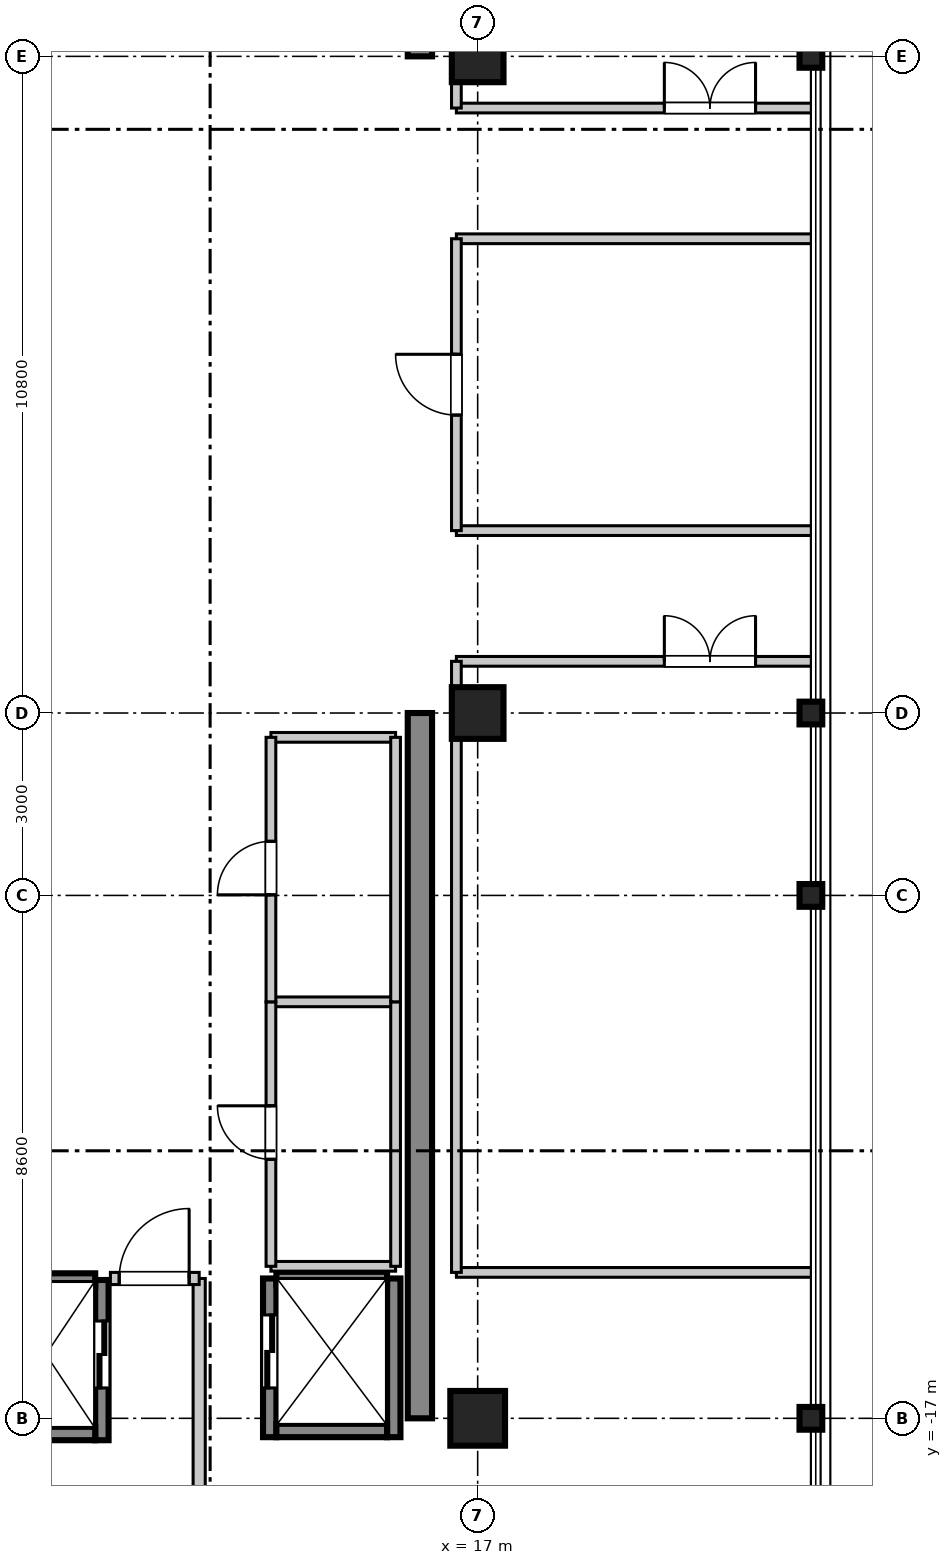
"""IFC4 building model, lengths in metres.
Left out: names, types, materials, properties, quantities, classifications, styles, units other than length and angle.
Written with IfcOpenShell. Run it as: python <this file> out.ifc"""

import sys

from ifc_helpers import new_model, si_unit, direction, frame, frame_2d, origin, origin_2d, place, context, subcontext, project, spatial, rectangle, i_section, extrude, source, transform, mapped, element, fill, save


model = new_model("IFC4")
c1 = context("Model", 3, precision=1e-05, world=origin(), true_north=direction((0.0, 1.0)))
c2 = subcontext(c1, "Body", "Model", "MODEL_VIEW")
j1 = project(units=[si_unit("LENGTHUNIT", "METRE"), si_unit("PLANEANGLEUNIT", "RADIAN")], contexts=[c1])
p1 = place(None, origin())
s1 = spatial("IfcSite", under=j1, at=p1, CompositionType="ELEMENT")
p2 = place(p1, origin())
s2 = spatial("IfcBuilding", under=s1, at=p2, CompositionType="ELEMENT")
p3 = place(p2, frame((0.0, 0.0, 352.05)))
s3 = spatial("IfcBuildingStorey", under=s2, at=p3, CompositionType="ELEMENT", Elevation=352.05)
m1 = source(origin(), c2, "Body", "SweptSolid", [
    extrude(rectangle(XDim=0.9, YDim=0.9, at=origin_2d()), origin(), (0.0, 0.0, 1.0), 4.955),
])
p4 = place(p3, frame((17.0, -17.0, 0.0), z_axis=(0.0, 0.0, 1.0), x_axis=(1.0, 0.0, 0.0)))
e1 = element("IfcColumn", 1, at=p4, inside=s3, PredefinedType="COLUMN", context=c2, shape_type="MappedRepresentation", body=[
    mapped(m1, transform((0.0, 0.0, 0.0), scale=1.0)),
])
m2 = source(origin(), c2, "Body", "SweptSolid", [
    extrude(rectangle(XDim=0.85, YDim=0.85, at=origin_2d()), origin(), (0.0, 0.0, 1.0), 4.955),
])
for number, where, z_axis, x_axis in (
    (2, (17.0, -5.4, 0.0), (0.0, 0.0, 1.0), (1.0, 0.0, 0.0)),
    (3, (17.0, 5.4, 0.0), (0.0, 0.0, 1.0), (1.0, 0.0, 0.0)),
):
    element("IfcColumn", number, at=place(p3, frame(where, z_axis=z_axis, x_axis=x_axis)), inside=s3, PredefinedType="PILASTER", context=c2, shape_type="MappedRepresentation", body=[
        mapped(m2, transform((0.0, 0.0, 0.0), scale=1.0)),
    ])
m3 = source(origin(), c2, "Body", "SweptSolid", [
    extrude(i_section(OverallWidth=0.374, OverallDepth=0.374, WebThickness=0.014, FlangeThickness=0.023, at=origin_2d()), origin(), (0.0, 0.0, 1.0), 4.955),
])
for number, where, z_axis, x_axis in (
    (4, (22.48, -17.0, 0.0), (0.0, 0.0, 1.0), (1.0, 0.0, 0.0)),
    (5, (22.48, -8.4, 0.0), (0.0, 0.0, 1.0), (1.0, 0.0, 0.0)),
    (6, (22.48, -5.4, 0.0), (0.0, 0.0, 1.0), (1.0, 0.0, 0.0)),
    (7, (22.48, 5.4, 0.0), (0.0, 0.0, 1.0), (1.0, 0.0, 0.0)),
):
    element("IfcColumn", number, at=place(p3, frame(where, z_axis=z_axis, x_axis=x_axis)), inside=s3, PredefinedType="COLUMN", context=c2, shape_type="MappedRepresentation", body=[
        mapped(m3, transform((0.0, 0.0, 0.0), scale=1.0)),
    ])
m4 = source(origin(), c2, "Body", "SweptSolid", [
    extrude(rectangle(XDim=11.6, YDim=0.4, at=frame_2d((5.8, 0.0))), origin(), (0.0, 0.0, 1.0), 4.7),
])
for number, where, z_axis, x_axis in (
    (8, (16.05, 5.4, 0.0), (0.0, 0.0, 1.0), (0.0, 1.0, 0.0)),
    (9, (16.05, -17.0, 0.0), (0.0, 0.0, 1.0), (0.0, 1.0, 0.0)),
):
    element("IfcWall", number, at=place(p3, frame(where, z_axis=z_axis, x_axis=x_axis)), inside=s3, PredefinedType="SHEAR", context=c2, shape_type="MappedRepresentation", body=[
        mapped(m4, transform((0.0, 0.0, 0.0), scale=1.0)),
    ])
m5 = source(origin(), c2, "Body", "SweptSolid", [
    extrude(rectangle(XDim=2.635, YDim=0.22, at=frame_2d((1.317, 0.0))), origin(), (0.0, 0.0, 1.0), 4.7),
])
p5 = place(p3, frame((10.82, -17.36, 0.0), z_axis=(0.0, 0.0, 1.0), x_axis=(0.0, 1.0, 0.0)))
e10 = element("IfcWall", 10, at=p5, inside=s3, PredefinedType="SHEAR", context=c2, shape_type="MappedRepresentation", body=[
    mapped(m5, transform((0.0, 0.0, 0.0), scale=1.0)),
])
p6 = place(p5, frame((0.86, 0.0, 0.0)))
e11 = element("IfcOpeningElement", 11, at=p6, cuts=e10, PredefinedType="OPENING", context=c2, shape_type="SweptSolid", body=[
    extrude(rectangle(XDim=1.1, YDim=2.2, at=frame_2d((0.55, 1.1))), frame((0.0, 0.12, 0.0), z_axis=(0.0, -1.0, 0.0), x_axis=(1.0, 0.0, 0.0)), (0.0, 0.0, 1.0), 0.24),
])
m6 = source(origin(), c2, "Body", "SweptSolid", [
    extrude(rectangle(XDim=1.62, YDim=0.22, at=frame_2d((0.81, 0.0))), origin(), (0.0, 0.0, 1.0), 4.7),
])
p7 = place(p3, frame((9.09, -17.25, 0.0), z_axis=(0.0, 0.0, 1.0), x_axis=(1.0, 0.0, 0.0)))
e12 = element("IfcWall", 12, at=p7, inside=s3, PredefinedType="SHEAR", context=c2, shape_type="MappedRepresentation", body=[
    mapped(m6, transform((0.0, 0.0, 0.0), scale=1.0)),
])
m7 = source(origin(), c2, "Body", "SweptSolid", [
    extrude(rectangle(XDim=1.62, YDim=0.22, at=frame_2d((0.81, 0.0))), origin(), (0.0, 0.0, 1.0), 5.0),
])
p8 = place(p3, frame((9.09, -14.725, 0.0), z_axis=(0.0, 0.0, 1.0), x_axis=(1.0, 0.0, 0.0)))
e13 = element("IfcWall", 13, at=p8, inside=s3, PredefinedType="SHEAR", context=c2, shape_type="MappedRepresentation", body=[
    mapped(m7, transform((0.0, 0.0, 0.0), scale=1.0)),
])
m8 = source(origin(), c2, "Body", "SweptSolid", [
    extrude(rectangle(XDim=2.61, YDim=0.22, at=frame_2d((1.305, 0.0))), origin(), (0.0, 0.0, 1.0), 4.7),
])
p9 = place(p3, frame((13.58, -17.31, 0.0), z_axis=(0.0, 0.0, 1.0), x_axis=(0.0, 1.0, 0.0)))
e14 = element("IfcWall", 14, at=p9, inside=s3, PredefinedType="SHEAR", context=c2, shape_type="MappedRepresentation", body=[
    mapped(m8, transform((0.0, 0.0, 0.0), scale=1.0)),
])
p10 = place(p9, frame((0.81, 0.0, 0.0)))
e15 = element("IfcOpeningElement", 15, at=p10, cuts=e14, PredefinedType="OPENING", context=c2, shape_type="SweptSolid", body=[
    extrude(rectangle(XDim=1.2, YDim=2.2, at=frame_2d((0.6, 1.1))), frame((0.0, 0.12, 0.0), z_axis=(0.0, -1.0, 0.0), x_axis=(1.0, 0.0, 0.0)), (0.0, 0.0, 1.0), 0.24),
])
p11 = place(p3, frame((15.62, -17.31, 0.0), z_axis=(0.0, 0.0, 1.0), x_axis=(0.0, 1.0, 0.0)))
e16 = element("IfcWall", 16, at=p11, inside=s3, PredefinedType="SHEAR", context=c2, shape_type="MappedRepresentation", body=[
    mapped(m8, transform((0.0, 0.0, 0.0), scale=1.0)),
])
m9 = source(origin(), c2, "Body", "SweptSolid", [
    extrude(rectangle(XDim=1.82, YDim=0.22, at=frame_2d((0.91, 0.0))), origin(), (0.0, 0.0, 1.0), 4.7),
])
p12 = place(p3, frame((13.69, -17.2, 0.0), z_axis=(0.0, 0.0, 1.0), x_axis=(1.0, 0.0, 0.0)))
e17 = element("IfcWall", 17, at=p12, inside=s3, PredefinedType="SHEAR", context=c2, shape_type="MappedRepresentation", body=[
    mapped(m9, transform((0.0, 0.0, 0.0), scale=1.0)),
])
m10 = source(origin(), c2, "Body", "SweptSolid", [
    extrude(rectangle(XDim=1.82, YDim=0.22, at=frame_2d((0.91, 0.0))), origin(), (0.0, 0.0, 1.0), 5.0),
])
p13 = place(p3, frame((13.69, -14.7, 0.0), z_axis=(0.0, 0.0, 1.0), x_axis=(1.0, 0.0, 0.0)))
e18 = element("IfcWall", 18, at=p13, inside=s3, PredefinedType="SHEAR", context=c2, shape_type="MappedRepresentation", body=[
    mapped(m10, transform((0.0, 0.0, 0.0), scale=1.0)),
])
m11 = source(origin(), c2, "Body", "SweptSolid", [
    extrude(rectangle(XDim=5.1, YDim=0.2, at=frame_2d((2.55, 0.0))), origin(), (0.0, 0.0, 1.0), 3.4),
])
p14 = place(p3, frame((12.42, -19.8, 0.0), z_axis=(0.0, 0.0, 1.0), x_axis=(0.0, 1.0, 0.0)))
e19 = element("IfcWall", 19, at=p14, inside=s3, PredefinedType="PARTITIONING", context=c2, shape_type="MappedRepresentation", body=[
    mapped(m11, transform((0.0, 0.0, 0.0), scale=1.0)),
])
m12 = source(origin(), c2, "Body", "SweptSolid", [
    extrude(rectangle(XDim=1.46, YDim=0.2, at=frame_2d((0.73, 0.0))), origin(), (0.0, 0.0, 1.0), 3.4),
])
p15 = place(p3, frame((10.96, -14.7, 0.0), z_axis=(0.0, 0.0, 1.0), x_axis=(1.0, 0.0, 0.0)))
e20 = element("IfcWall", 20, at=p15, inside=s3, PredefinedType="PARTITIONING", context=c2, shape_type="MappedRepresentation", body=[
    mapped(m12, transform((0.0, 0.0, 0.0), scale=1.0)),
])
p16 = place(p15, frame((0.145, 0.0, 0.0)))
e21 = element("IfcOpeningElement", 21, at=p16, cuts=e20, PredefinedType="OPENING", context=c2, shape_type="SweptSolid", body=[
    extrude(rectangle(XDim=1.15, YDim=2.15, at=frame_2d((0.575, 1.075))), frame((0.0, 0.11, 0.0), z_axis=(0.0, -1.0, 0.0), x_axis=(1.0, 0.0, 0.0)), (0.0, 0.0, 1.0), 0.22),
])
m13 = source(origin(), c2, "Body", "SweptSolid", [
    extrude(rectangle(XDim=2.05, YDim=0.16, at=frame_2d((1.025, 0.0))), origin(), (0.0, 0.0, 1.0), 3.4),
])
for number, where, z_axis, x_axis in (
    (22, (13.6, -14.5, 0.0), (0.0, 0.0, 1.0), (1.0, 0.0, 0.0)),
    (23, (13.6, -10.15, 0.0), (0.0, 0.0, 1.0), (1.0, 0.0, 0.0)),
):
    element("IfcWall", number, at=place(p3, frame(where, z_axis=z_axis, x_axis=x_axis)), inside=s3, PredefinedType="PARTITIONING", context=c2, shape_type="MappedRepresentation", body=[
        mapped(m13, transform((0.0, 0.0, 0.0), scale=1.0)),
    ])
m14 = source(origin(), c2, "Body", "SweptSolid", [
    extrude(rectangle(XDim=4.35, YDim=0.16, at=frame_2d((2.175, 0.0))), origin(), (0.0, 0.0, 1.0), 3.4),
])
p17 = place(p3, frame((13.6, -14.5, 0.0), z_axis=(0.0, 0.0, 1.0), x_axis=(0.0, 1.0, 0.0)))
e24 = element("IfcWall", 24, at=p17, inside=s3, PredefinedType="PARTITIONING", context=c2, shape_type="MappedRepresentation", body=[
    mapped(m14, transform((0.0, 0.0, 0.0), scale=1.0)),
])
p18 = place(p17, frame((1.76, 0.0, 0.0)))
e25 = element("IfcOpeningElement", 25, at=p18, cuts=e24, PredefinedType="OPENING", context=c2, shape_type="SweptSolid", body=[
    extrude(rectangle(XDim=0.88, YDim=2.1, at=frame_2d((0.44, 1.05))), frame((0.0, 0.09, 0.0), z_axis=(0.0, -1.0, 0.0), x_axis=(1.0, 0.0, 0.0)), (0.0, 0.0, 1.0), 0.18),
])
p19 = place(p3, frame((15.65, -14.5, 0.0), z_axis=(0.0, 0.0, 1.0), x_axis=(0.0, 1.0, 0.0)))
e26 = element("IfcWall", 26, at=p19, inside=s3, PredefinedType="PARTITIONING", context=c2, shape_type="MappedRepresentation", body=[
    mapped(m14, transform((0.0, 0.0, 0.0), scale=1.0)),
])
p20 = place(p3, frame((13.6, -5.8, 0.0), z_axis=(0.0, 0.0, 1.0), x_axis=(1.0, 0.0, 0.0)))
e27 = element("IfcWall", 27, at=p20, inside=s3, PredefinedType="PARTITIONING", context=c2, shape_type="MappedRepresentation", body=[
    mapped(m13, transform((0.0, 0.0, 0.0), scale=1.0)),
])
m15 = source(origin(), c2, "Body", "SweptSolid", [
    extrude(rectangle(XDim=4.35, YDim=0.16, at=frame_2d((2.175, 0.0))), origin(), (0.0, 0.0, 1.0), 3.4),
])
p21 = place(p3, frame((13.6, -10.15, 0.0), z_axis=(0.0, 0.0, 1.0), x_axis=(0.0, 1.0, 0.0)))
e28 = element("IfcWall", 28, at=p21, inside=s3, PredefinedType="PARTITIONING", context=c2, shape_type="MappedRepresentation", body=[
    mapped(m15, transform((0.0, 0.0, 0.0), scale=1.0)),
])
p22 = place(p21, frame((1.76, 0.0, 0.0)))
e29 = element("IfcOpeningElement", 29, at=p22, cuts=e28, PredefinedType="OPENING", context=c2, shape_type="SweptSolid", body=[
    extrude(rectangle(XDim=0.88, YDim=2.1, at=frame_2d((0.44, 1.05))), frame((0.0, 0.09, 0.0), z_axis=(0.0, -1.0, 0.0), x_axis=(1.0, 0.0, 0.0)), (0.0, 0.0, 1.0), 0.18),
])
p23 = place(p3, frame((15.65, -10.15, 0.0), z_axis=(0.0, 0.0, 1.0), x_axis=(0.0, 1.0, 0.0)))
e30 = element("IfcWall", 30, at=p23, inside=s3, PredefinedType="PARTITIONING", context=c2, shape_type="MappedRepresentation", body=[
    mapped(m15, transform((0.0, 0.0, 0.0), scale=1.0)),
])
m16 = source(origin(), c2, "Body", "SweptSolid", [
    extrude(rectangle(XDim=5.85, YDim=0.16, at=frame_2d((2.925, 0.0))), origin(), (0.0, 0.0, 1.0), 3.4),
])
for number, where, z_axis, x_axis in (
    (31, (16.65, -2.4, 0.0), (0.0, 0.0, 1.0), (1.0, 0.0, 0.0)),
    (32, (16.65, 2.4, 0.0), (0.0, 0.0, 1.0), (1.0, 0.0, 0.0)),
):
    element("IfcWall", number, at=place(p3, frame(where, z_axis=z_axis, x_axis=x_axis)), inside=s3, PredefinedType="PARTITIONING", context=c2, shape_type="MappedRepresentation", body=[
        mapped(m16, transform((0.0, 0.0, 0.0), scale=1.0)),
    ])
m17 = source(origin(), c2, "Body", "SweptSolid", [
    extrude(rectangle(XDim=4.8, YDim=0.16, at=frame_2d((2.4, 0.0))), origin(), (0.0, 0.0, 1.0), 3.4),
])
p24 = place(p3, frame((16.65, -2.4, 0.0), z_axis=(0.0, 0.0, 1.0), x_axis=(0.0, 1.0, 0.0)))
e33 = element("IfcWall", 33, at=p24, inside=s3, PredefinedType="PARTITIONING", context=c2, shape_type="MappedRepresentation", body=[
    mapped(m17, transform((0.0, 0.0, 0.0), scale=1.0)),
])
p25 = place(p24, frame((1.9, 0.0, 0.0)))
e34 = element("IfcOpeningElement", 34, at=p25, cuts=e33, PredefinedType="OPENING", context=c2, shape_type="SweptSolid", body=[
    extrude(rectangle(XDim=1.0, YDim=2.1, at=frame_2d((0.5, 1.05))), frame((0.0, 0.09, 0.0), z_axis=(0.0, -1.0, 0.0), x_axis=(1.0, 0.0, 0.0)), (0.0, 0.0, 1.0), 0.18),
])
p26 = place(p3, frame((16.65, 4.55, 0.0), z_axis=(0.0, 0.0, 1.0), x_axis=(1.0, 0.0, 0.0)))
e35 = element("IfcWall", 35, at=p26, inside=s3, PredefinedType="PARTITIONING", context=c2, shape_type="MappedRepresentation", body=[
    mapped(m16, transform((0.0, 0.0, 0.0), scale=1.0)),
])
p27 = place(p26, frame((3.42, 0.0, 0.0)))
e36 = element("IfcOpeningElement", 36, at=p27, cuts=e35, PredefinedType="OPENING", context=c2, shape_type="SweptSolid", body=[
    extrude(rectangle(XDim=1.5, YDim=2.15, at=frame_2d((0.75, 1.075))), frame((0.0, 0.09, 0.0), z_axis=(0.0, -1.0, 0.0), x_axis=(1.0, 0.0, 0.0)), (0.0, 0.0, 1.0), 0.18),
])
m18 = source(origin(), c2, "Body", "SweptSolid", [
    extrude(rectangle(XDim=17.95, YDim=0.16, at=frame_2d((8.975, 0.0))), origin(), (0.0, 0.0, 1.0), 3.4),
])
p28 = place(p3, frame((16.65, 4.55, 0.0), z_axis=(0.0, 0.0, 1.0), x_axis=(0.0, 1.0, 0.0)))
e37 = element("IfcWall", 37, at=p28, inside=s3, PredefinedType="PARTITIONING", context=c2, shape_type="MappedRepresentation", body=[
    mapped(m18, transform((0.0, 0.0, 0.0), scale=1.0)),
])
p29 = place(p3, frame((16.65, -14.6, 0.0), z_axis=(0.0, 0.0, 1.0), x_axis=(1.0, 0.0, 0.0)))
e38 = element("IfcWall", 38, at=p29, inside=s3, PredefinedType="PARTITIONING", context=c2, shape_type="MappedRepresentation", body=[
    mapped(m16, transform((0.0, 0.0, 0.0), scale=1.0)),
])
p30 = place(p3, frame((16.65, -4.55, 0.0), z_axis=(0.0, 0.0, 1.0), x_axis=(1.0, 0.0, 0.0)))
e39 = element("IfcWall", 39, at=p30, inside=s3, PredefinedType="PARTITIONING", context=c2, shape_type="MappedRepresentation", body=[
    mapped(m16, transform((0.0, 0.0, 0.0), scale=1.0)),
])
p31 = place(p30, frame((3.42, 0.0, 0.0)))
e40 = element("IfcOpeningElement", 40, at=p31, cuts=e39, PredefinedType="OPENING", context=c2, shape_type="SweptSolid", body=[
    extrude(rectangle(XDim=1.5, YDim=2.15, at=frame_2d((0.75, 1.075))), frame((0.0, 0.09, 0.0), z_axis=(0.0, -1.0, 0.0), x_axis=(1.0, 0.0, 0.0)), (0.0, 0.0, 1.0), 0.18),
])
m19 = source(origin(), c2, "Body", "SweptSolid", [
    extrude(rectangle(XDim=10.05, YDim=0.16, at=frame_2d((5.025, 0.0))), origin(), (0.0, 0.0, 1.0), 3.4),
])
p32 = place(p3, frame((16.65, -14.6, 0.0), z_axis=(0.0, 0.0, 1.0), x_axis=(0.0, 1.0, 0.0)))
e41 = element("IfcWall", 41, at=p32, inside=s3, PredefinedType="PARTITIONING", context=c2, shape_type="MappedRepresentation", body=[
    mapped(m19, transform((0.0, 0.0, 0.0), scale=1.0)),
])
m20 = source(origin(), c2, "Body", "SweptSolid", [
    extrude(rectangle(XDim=1.1, YDim=2.2, at=frame_2d((0.55, 1.1))), frame((0.0, 0.025, 0.0), z_axis=(0.0, -1.0, 0.0), x_axis=(1.0, 0.0, 0.0)), (0.0, 0.0, 1.0), 0.05),
])
p33 = place(p6, frame((1.1, 0.0, 0.0), z_axis=(0.0, 0.0, 1.0), x_axis=(-1.0, 0.0, 0.0)))
e42 = element("IfcDoor", 42, at=p33, inside=s3, OperationType="DOUBLE_DOOR_SLIDING", PredefinedType="DOOR", context=c2, shape_type="MappedRepresentation", body=[
    mapped(m20, transform((0.0, 0.0, 0.0), scale=1.0)),
])
fill(e11, e42)
m21 = source(origin(), c2, "Body", "SweptSolid", [
    extrude(rectangle(XDim=1.2, YDim=2.2, at=frame_2d((0.6, 1.1))), frame((0.0, 0.025, 0.0), z_axis=(0.0, -1.0, 0.0), x_axis=(1.0, 0.0, 0.0)), (0.0, 0.0, 1.0), 0.05),
])
p34 = place(p10, origin())
e43 = element("IfcDoor", 43, at=p34, inside=s3, OperationType="DOUBLE_DOOR_SLIDING", PredefinedType="DOOR", context=c2, shape_type="MappedRepresentation", body=[
    mapped(m21, transform((0.0, 0.0, 0.0), scale=1.0)),
])
fill(e15, e43)
m22 = source(origin(), c2, "Body", "SweptSolid", [
    extrude(rectangle(XDim=1.15, YDim=2.15, at=frame_2d((0.575, 1.075))), frame((0.0, 0.025, 0.0), z_axis=(0.0, -1.0, 0.0), x_axis=(1.0, 0.0, 0.0)), (0.0, 0.0, 1.0), 0.05),
])
p35 = place(p16, origin())
e44 = element("IfcDoor", 44, at=p35, inside=s3, OperationType="SINGLE_SWING_RIGHT", PredefinedType="DOOR", context=c2, shape_type="MappedRepresentation", body=[
    mapped(m22, transform((0.0, 0.0, 0.0), scale=1.0)),
])
fill(e21, e44)
m23 = source(origin(), c2, "Body", "SweptSolid", [
    extrude(rectangle(XDim=0.88, YDim=2.1, at=frame_2d((0.44, 1.05))), frame((0.0, 0.025, 0.0), z_axis=(0.0, -1.0, 0.0), x_axis=(1.0, 0.0, 0.0)), (0.0, 0.0, 1.0), 0.05),
])
p36 = place(p18, frame((0.88, 0.0, 0.0), z_axis=(0.0, 0.0, 1.0), x_axis=(-1.0, 0.0, 0.0)))
e45 = element("IfcDoor", 45, at=p36, inside=s3, OperationType="SINGLE_SWING_RIGHT", PredefinedType="DOOR", context=c2, shape_type="MappedRepresentation", body=[
    mapped(m23, transform((0.0, 0.0, 0.0), scale=1.0)),
])
fill(e25, e45)
p37 = place(p22, frame((0.88, 0.0, 0.0), z_axis=(0.0, 0.0, 1.0), x_axis=(-1.0, 0.0, 0.0)))
e46 = element("IfcDoor", 46, at=p37, inside=s3, OperationType="SINGLE_SWING_LEFT", PredefinedType="DOOR", context=c2, shape_type="MappedRepresentation", body=[
    mapped(m23, transform((0.0, 0.0, 0.0), scale=1.0)),
])
fill(e29, e46)
m24 = source(origin(), c2, "Body", "SweptSolid", [
    extrude(rectangle(XDim=1.0, YDim=2.1, at=frame_2d((0.5, 1.05))), frame((0.0, 0.025, 0.0), z_axis=(0.0, -1.0, 0.0), x_axis=(1.0, 0.0, 0.0)), (0.0, 0.0, 1.0), 0.05),
])
p38 = place(p25, frame((1.0, 0.0, 0.0), z_axis=(0.0, 0.0, 1.0), x_axis=(-1.0, 0.0, 0.0)))
e47 = element("IfcDoor", 47, at=p38, inside=s3, OperationType="SINGLE_SWING_RIGHT", PredefinedType="DOOR", context=c2, shape_type="MappedRepresentation", body=[
    mapped(m24, transform((0.0, 0.0, 0.0), scale=1.0)),
])
fill(e34, e47)
m25 = source(origin(), c2, "Body", "SweptSolid", [
    extrude(rectangle(XDim=1.5, YDim=2.15, at=frame_2d((0.75, 1.075))), frame((0.0, 0.025, 0.0), z_axis=(0.0, -1.0, 0.0), x_axis=(1.0, 0.0, 0.0)), (0.0, 0.0, 1.0), 0.05),
])
p39 = place(p27, origin())
e48 = element("IfcDoor", 48, at=p39, inside=s3, OperationType="DOUBLE_DOOR_SINGLE_SWING", PredefinedType="DOOR", context=c2, shape_type="MappedRepresentation", body=[
    mapped(m25, transform((0.0, 0.0, 0.0), scale=1.0)),
])
fill(e36, e48)
p40 = place(p31, frame((1.5, 0.0, 0.0), z_axis=(0.0, 0.0, 1.0), x_axis=(-1.0, 0.0, 0.0)))
e49 = element("IfcDoor", 49, at=p40, inside=s3, OperationType="DOUBLE_DOOR_SINGLE_SWING", PredefinedType="DOOR", context=c2, shape_type="MappedRepresentation", body=[
    mapped(m25, transform((0.0, 0.0, 0.0), scale=1.0)),
])
fill(e40, e49)
save(model, sys.argv[1])
